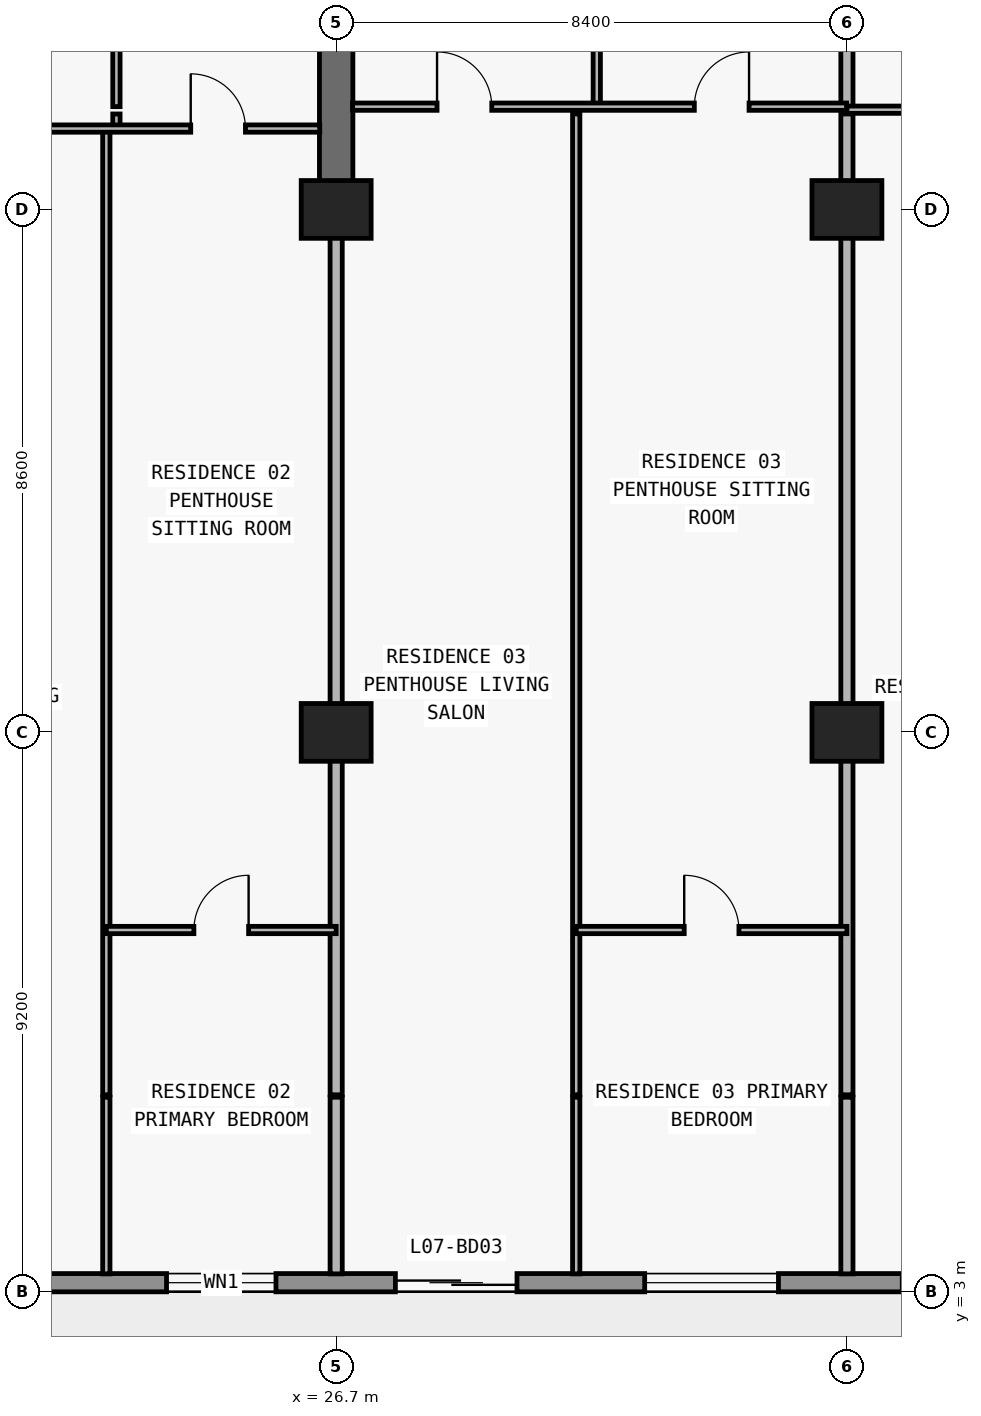
"""IFC4 building model, lengths in metres.
Left out: names, types, materials, properties, quantities, classifications, styles, units other than length and angle.
Written with IfcOpenShell. Run it as: python <this file> out.ifc"""

import sys

from ifc_helpers import new_model, si_unit, direction, frame, frame_2d, origin, origin_2d, place, context, subcontext, project, spatial, rectangle, extrude, element, fill, save


model = new_model("IFC4")
c1 = context("Model", 3, precision=1e-05, world=origin(), true_north=direction((0.0, 1.0)))
c2 = subcontext(c1, "Body", "Model", "MODEL_VIEW")
j1 = project(units=[si_unit("LENGTHUNIT", "METRE"), si_unit("PLANEANGLEUNIT", "RADIAN")], contexts=[c1])
p1 = place(None, origin())
s1 = spatial("IfcSite", under=j1, at=p1, CompositionType="ELEMENT")
p2 = place(p1, origin())
s2 = spatial("IfcBuilding", under=s1, at=p2, CompositionType="ELEMENT")
p3 = place(p2, frame((0.0, 0.0, 33.3)))
s3 = spatial("IfcBuildingStorey", under=s2, at=p3, CompositionType="ELEMENT", Elevation=33.3)
for number, where, z_axis, x_axis in (
    (1, (26.7, 12.2, 0.0), (0.0, 0.0, 1.0), (1.0, 0.0, 0.0)),
    (2, (35.1, 12.2, 0.0), (0.0, 0.0, 1.0), (1.0, 0.0, 0.0)),
    (3, (26.7, 20.8, 0.0), (0.0, 0.0, 1.0), (1.0, 0.0, 0.0)),
    (4, (35.1, 20.8, 0.0), (0.0, 0.0, 1.0), (1.0, 0.0, 0.0)),
):
    element("IfcColumn", number, at=place(p3, frame(where, z_axis=z_axis, x_axis=x_axis)), inside=s3, PredefinedType="COLUMN", context=c2, shape_type="SweptSolid", body=[
        extrude(rectangle(XDim=1.15, YDim=0.95, at=origin_2d()), origin(), (0.0, 0.0, 1.0), 3.05),
    ])
p4 = place(p3, frame((26.7, 20.8, 0.0), z_axis=(0.0, 0.0, 1.0), x_axis=(0.0, 1.0, 0.0)))
e5 = element("IfcWall", 5, at=p4, inside=s3, PredefinedType="SHEAR", context=c2, shape_type="SweptSolid", body=[
    extrude(rectangle(XDim=8.6, YDim=0.55, at=frame_2d((4.3, 0.0))), origin(), (0.0, 0.0, 1.0), 3.05),
])
p5 = place(p3, frame((72.7, 3.15, 0.0), z_axis=(0.0, 0.0, 1.0), x_axis=(-1.0, 0.0, 0.0)))
e6 = element("IfcWall", 6, at=p5, inside=s3, PredefinedType="STANDARD", context=c2, shape_type="SweptSolid", body=[
    extrude(rectangle(XDim=67.6, YDim=0.3, at=frame_2d((33.8, 0.0))), origin(), (0.0, 0.0, 1.0), 3.05),
])
p6 = place(p5, frame((59.826, 0.0, 0.0)))
e7 = element("IfcOpeningElement", 7, at=p6, cuts=e6, PredefinedType="OPENING", context=c2, shape_type="SweptSolid", body=[
    extrude(rectangle(XDim=2.0, YDim=2.3, at=frame_2d((1.0, 1.15))), frame((0.0, 0.16, 0.0), z_axis=(0.0, -1.0, 0.0), x_axis=(1.0, 0.0, 0.0)), (0.0, 0.0, 1.0), 0.32),
])
p7 = place(p5, frame((55.526, 0.0, 0.85)))
e8 = element("IfcOpeningElement", 8, at=p7, cuts=e6, PredefinedType="OPENING", context=c2, shape_type="SweptSolid", body=[
    extrude(rectangle(XDim=2.2, YDim=1.55, at=frame_2d((1.1, 0.775))), frame((0.0, 0.16, 0.0), z_axis=(0.0, -1.0, 0.0), x_axis=(1.0, 0.0, 0.0)), (0.0, 0.0, 1.0), 0.32),
])
p8 = place(p5, frame((51.09, 0.0, 0.0)))
e9 = element("IfcOpeningElement", 9, at=p8, cuts=e6, PredefinedType="OPENING", context=c2, shape_type="SweptSolid", body=[
    extrude(rectangle(XDim=2.0, YDim=2.3, at=frame_2d((1.0, 1.15))), frame((0.0, 0.16, 0.0), z_axis=(0.0, -1.0, 0.0), x_axis=(1.0, 0.0, 0.0)), (0.0, 0.0, 1.0), 0.32),
])
p9 = place(p5, frame((46.99, 0.0, 0.85)))
e10 = element("IfcOpeningElement", 10, at=p9, cuts=e6, PredefinedType="OPENING", context=c2, shape_type="SweptSolid", body=[
    extrude(rectangle(XDim=1.8, YDim=1.55, at=frame_2d((0.9, 0.775))), frame((0.0, 0.16, 0.0), z_axis=(0.0, -1.0, 0.0), x_axis=(1.0, 0.0, 0.0)), (0.0, 0.0, 1.0), 0.32),
])
p10 = place(p5, frame((43.026, 0.0, 0.0)))
e11 = element("IfcOpeningElement", 11, at=p10, cuts=e6, PredefinedType="OPENING", context=c2, shape_type="SweptSolid", body=[
    extrude(rectangle(XDim=2.0, YDim=2.3, at=frame_2d((1.0, 1.15))), frame((0.0, 0.16, 0.0), z_axis=(0.0, -1.0, 0.0), x_axis=(1.0, 0.0, 0.0)), (0.0, 0.0, 1.0), 0.32),
])
p11 = place(p5, frame((38.726, 0.0, 0.85)))
e12 = element("IfcOpeningElement", 12, at=p11, cuts=e6, PredefinedType="OPENING", context=c2, shape_type="SweptSolid", body=[
    extrude(rectangle(XDim=2.2, YDim=1.55, at=frame_2d((1.1, 0.775))), frame((0.0, 0.16, 0.0), z_axis=(0.0, -1.0, 0.0), x_axis=(1.0, 0.0, 0.0)), (0.0, 0.0, 1.0), 0.32),
])
p12 = place(p5, frame((34.69, 0.0, 0.0)))
e13 = element("IfcOpeningElement", 13, at=p12, cuts=e6, PredefinedType="OPENING", context=c2, shape_type="SweptSolid", body=[
    extrude(rectangle(XDim=2.0, YDim=2.3, at=frame_2d((1.0, 1.15))), frame((0.0, 0.16, 0.0), z_axis=(0.0, -1.0, 0.0), x_axis=(1.0, 0.0, 0.0)), (0.0, 0.0, 1.0), 0.32),
])
p13 = place(p5, frame((30.81, 0.0, 0.65)))
e14 = element("IfcOpeningElement", 14, at=p13, cuts=e6, PredefinedType="OPENING", context=c2, shape_type="SweptSolid", body=[
    extrude(rectangle(XDim=2.6, YDim=1.85, at=frame_2d((1.3, 0.925))), frame((0.0, 0.16, 0.0), z_axis=(0.0, -1.0, 0.0), x_axis=(1.0, 0.0, 0.0)), (0.0, 0.0, 1.0), 0.32),
])
p14 = place(p5, frame((24.7, 0.0, 0.85)))
e15 = element("IfcOpeningElement", 15, at=p14, cuts=e6, PredefinedType="OPENING", context=c2, shape_type="SweptSolid", body=[
    extrude(rectangle(XDim=2.2, YDim=1.55, at=frame_2d((1.1, 0.775))), frame((0.0, 0.16, 0.0), z_axis=(0.0, -1.0, 0.0), x_axis=(1.0, 0.0, 0.0)), (0.0, 0.0, 1.0), 0.32),
])
p15 = place(p5, frame((18.626, 0.0, 0.0)))
e16 = element("IfcOpeningElement", 16, at=p15, cuts=e6, PredefinedType="OPENING", context=c2, shape_type="SweptSolid", body=[
    extrude(rectangle(XDim=2.0, YDim=2.3, at=frame_2d((1.0, 1.15))), frame((0.0, 0.16, 0.0), z_axis=(0.0, -1.0, 0.0), x_axis=(1.0, 0.0, 0.0)), (0.0, 0.0, 1.0), 0.32),
])
p16 = place(p5, frame((14.326, 0.0, 0.85)))
e17 = element("IfcOpeningElement", 17, at=p16, cuts=e6, PredefinedType="OPENING", context=c2, shape_type="SweptSolid", body=[
    extrude(rectangle(XDim=2.2, YDim=1.55, at=frame_2d((1.1, 0.775))), frame((0.0, 0.16, 0.0), z_axis=(0.0, -1.0, 0.0), x_axis=(1.0, 0.0, 0.0)), (0.0, 0.0, 1.0), 0.32),
])
p17 = place(p5, frame((9.89, 0.0, 0.0)))
e18 = element("IfcOpeningElement", 18, at=p17, cuts=e6, PredefinedType="OPENING", context=c2, shape_type="SweptSolid", body=[
    extrude(rectangle(XDim=2.0, YDim=2.3, at=frame_2d((1.0, 1.15))), frame((0.0, 0.16, 0.0), z_axis=(0.0, -1.0, 0.0), x_axis=(1.0, 0.0, 0.0)), (0.0, 0.0, 1.0), 0.32),
])
p18 = place(p5, frame((5.79, 0.0, 0.85)))
e19 = element("IfcOpeningElement", 19, at=p18, cuts=e6, PredefinedType="OPENING", context=c2, shape_type="SweptSolid", body=[
    extrude(rectangle(XDim=1.8, YDim=1.55, at=frame_2d((0.9, 0.775))), frame((0.0, 0.16, 0.0), z_axis=(0.0, -1.0, 0.0), x_axis=(1.0, 0.0, 0.0)), (0.0, 0.0, 1.0), 0.32),
])
p19 = place(p3, frame((22.92, 3.295, 0.0), z_axis=(0.0, 0.0, 1.0), x_axis=(0.0, 1.0, 0.0)))
e20 = element("IfcWall", 20, at=p19, inside=s3, PredefinedType="PARTITIONING", context=c2, shape_type="SweptSolid", body=[
    extrude(rectangle(XDim=2.905, YDim=0.12, at=frame_2d((1.453, 0.0))), origin(), (0.0, 0.0, 1.0), 3.05),
])
p20 = place(p3, frame((22.92, 6.24, 0.0), z_axis=(0.0, 0.0, 1.0), x_axis=(0.0, 1.0, 0.0)))
e21 = element("IfcWall", 21, at=p20, inside=s3, PredefinedType="PARTITIONING", context=c2, shape_type="SweptSolid", body=[
    extrude(rectangle(XDim=15.89, YDim=0.12, at=frame_2d((7.945, 0.0))), origin(), (0.0, 0.0, 1.0), 3.05),
])
p21 = place(p3, frame((23.086, 22.135, 0.0), z_axis=(0.0, 0.0, 1.0), x_axis=(0.0, 1.0, 0.0)))
e22 = element("IfcWall", 22, at=p21, inside=s3, PredefinedType="PARTITIONING", context=c2, shape_type="SweptSolid", body=[
    extrude(rectangle(XDim=0.235, YDim=0.12, at=frame_2d((0.118, 0.0))), origin(), (0.0, 0.0, 1.0), 3.05),
])
p22 = place(p3, frame((23.086, 22.49, 0.0), z_axis=(0.0, 0.0, 1.0), x_axis=(0.0, 1.0, 0.0)))
e23 = element("IfcWall", 23, at=p22, inside=s3, PredefinedType="PARTITIONING", context=c2, shape_type="SweptSolid", body=[
    extrude(rectangle(XDim=4.69, YDim=0.12, at=frame_2d((2.345, 0.0))), origin(), (0.0, 0.0, 1.0), 3.05),
])
p23 = place(p22, frame((1.895, 0.0, 0.0)))
e24 = element("IfcOpeningElement", 24, at=p23, cuts=e23, PredefinedType="OPENING", context=c2, shape_type="SweptSolid", body=[
    extrude(rectangle(XDim=0.9, YDim=2.15, at=frame_2d((0.45, 1.075))), frame((0.0, 0.07, 0.0), z_axis=(0.0, -1.0, 0.0), x_axis=(1.0, 0.0, 0.0)), (0.0, 0.0, 1.0), 0.14),
])
p24 = place(p3, frame((26.7, 3.295, 0.0), z_axis=(0.0, 0.0, 1.0), x_axis=(0.0, 1.0, 0.0)))
e25 = element("IfcWall", 25, at=p24, inside=s3, PredefinedType="PARTITIONING", context=c2, shape_type="SweptSolid", body=[
    extrude(rectangle(XDim=2.905, YDim=0.2, at=frame_2d((1.453, 0.0))), origin(), (0.0, 0.0, 1.0), 3.05),
])
p25 = place(p3, frame((26.7, 6.24, 0.0), z_axis=(0.0, 0.0, 1.0), x_axis=(0.0, 1.0, 0.0)))
e26 = element("IfcWall", 26, at=p25, inside=s3, PredefinedType="PARTITIONING", context=c2, shape_type="SweptSolid", body=[
    extrude(rectangle(XDim=14.555, YDim=0.2, at=frame_2d((7.277, 0.0))), origin(), (0.0, 0.0, 1.0), 2.11),
])
p26 = place(p3, frame((30.648, 3.295, 0.0), z_axis=(0.0, 0.0, 1.0), x_axis=(0.0, 1.0, 0.0)))
e27 = element("IfcWall", 27, at=p26, inside=s3, PredefinedType="PARTITIONING", context=c2, shape_type="SweptSolid", body=[
    extrude(rectangle(XDim=2.905, YDim=0.12, at=frame_2d((1.453, 0.0))), origin(), (0.0, 0.0, 1.0), 3.05),
])
p27 = place(p3, frame((30.648, 6.24, 0.0), z_axis=(0.0, 0.0, 1.0), x_axis=(0.0, 1.0, 0.0)))
e28 = element("IfcWall", 28, at=p27, inside=s3, PredefinedType="PARTITIONING", context=c2, shape_type="SweptSolid", body=[
    extrude(rectangle(XDim=16.13, YDim=0.12, at=frame_2d((8.065, 0.0))), origin(), (0.0, 0.0, 1.0), 3.05),
])
p28 = place(p3, frame((30.986, 22.49, 0.0), z_axis=(0.0, 0.0, 1.0), x_axis=(0.0, 1.0, 0.0)))
e29 = element("IfcWall", 29, at=p28, inside=s3, PredefinedType="PARTITIONING", context=c2, shape_type="SweptSolid", body=[
    extrude(rectangle(XDim=4.69, YDim=0.12, at=frame_2d((2.345, 0.0))), origin(), (0.0, 0.0, 1.0), 3.05),
])
p29 = place(p28, frame((1.895, 0.0, 0.0)))
e30 = element("IfcOpeningElement", 30, at=p29, cuts=e29, PredefinedType="OPENING", context=c2, shape_type="SweptSolid", body=[
    extrude(rectangle(XDim=0.9, YDim=2.15, at=frame_2d((0.45, 1.075))), frame((0.0, 0.07, 0.0), z_axis=(0.0, -1.0, 0.0), x_axis=(1.0, 0.0, 0.0)), (0.0, 0.0, 1.0), 0.14),
])
p30 = place(p3, frame((35.1, 3.295, 0.0), z_axis=(0.0, 0.0, 1.0), x_axis=(0.0, 1.0, 0.0)))
e31 = element("IfcWall", 31, at=p30, inside=s3, PredefinedType="PARTITIONING", context=c2, shape_type="SweptSolid", body=[
    extrude(rectangle(XDim=2.905, YDim=0.2, at=frame_2d((1.453, 0.0))), origin(), (0.0, 0.0, 1.0), 3.05),
])
p31 = place(p3, frame((35.1, 6.24, 0.0), z_axis=(0.0, 0.0, 1.0), x_axis=(0.0, 1.0, 0.0)))
e32 = element("IfcWall", 32, at=p31, inside=s3, PredefinedType="PARTITIONING", context=c2, shape_type="SweptSolid", body=[
    extrude(rectangle(XDim=16.13, YDim=0.2, at=frame_2d((8.065, 0.0))), origin(), (0.0, 0.0, 1.0), 2.11),
])
p32 = place(p3, frame((35.1, 22.49, 0.0), z_axis=(0.0, 0.0, 1.0), x_axis=(0.0, 1.0, 0.0)))
e33 = element("IfcWall", 33, at=p32, inside=s3, PredefinedType="PARTITIONING", context=c2, shape_type="SweptSolid", body=[
    extrude(rectangle(XDim=4.69, YDim=0.2, at=frame_2d((2.345, 0.0))), origin(), (0.0, 0.0, 1.0), 2.11),
])
p33 = place(p3, frame((22.92, 8.95, 0.0), z_axis=(0.0, 0.0, 1.0), x_axis=(1.0, 0.0, 0.0)))
e34 = element("IfcWall", 34, at=p33, inside=s3, PredefinedType="PARTITIONING", context=c2, shape_type="SweptSolid", body=[
    extrude(rectangle(XDim=3.78, YDim=0.12, at=frame_2d((1.89, 0.0))), origin(), (0.0, 0.0, 1.0), 3.05),
])
p34 = place(p33, frame((1.44, 0.0, 0.0)))
e35 = element("IfcOpeningElement", 35, at=p34, cuts=e34, PredefinedType="OPENING", context=c2, shape_type="SweptSolid", body=[
    extrude(rectangle(XDim=0.9, YDim=2.15, at=frame_2d((0.45, 1.075))), frame((0.0, 0.07, 0.0), z_axis=(0.0, -1.0, 0.0), x_axis=(1.0, 0.0, 0.0)), (0.0, 0.0, 1.0), 0.14),
])
p35 = place(p3, frame((30.648, 8.95, 0.0), z_axis=(0.0, 0.0, 1.0), x_axis=(1.0, 0.0, 0.0)))
e36 = element("IfcWall", 36, at=p35, inside=s3, PredefinedType="PARTITIONING", context=c2, shape_type="SweptSolid", body=[
    extrude(rectangle(XDim=4.452, YDim=0.12, at=frame_2d((2.226, 0.0))), origin(), (0.0, 0.0, 1.0), 3.05),
])
p36 = place(p35, frame((1.776, 0.0, 0.0)))
e37 = element("IfcOpeningElement", 37, at=p36, cuts=e36, PredefinedType="OPENING", context=c2, shape_type="SweptSolid", body=[
    extrude(rectangle(XDim=0.9, YDim=2.15, at=frame_2d((0.45, 1.075))), frame((0.0, 0.07, 0.0), z_axis=(0.0, -1.0, 0.0), x_axis=(1.0, 0.0, 0.0)), (0.0, 0.0, 1.0), 0.14),
])
p37 = place(p3, frame((18.3, 22.13, 0.0), z_axis=(0.0, 0.0, 1.0), x_axis=(1.0, 0.0, 0.0)))
e38 = element("IfcWall", 38, at=p37, inside=s3, PredefinedType="PARTITIONING", context=c2, shape_type="SweptSolid", body=[
    extrude(rectangle(XDim=8.13, YDim=0.12, at=frame_2d((4.065, 0.0))), origin(), (0.0, 0.0, 1.0), 3.05),
])
p38 = place(p37, frame((1.86, 0.0, 0.0)))
e39 = element("IfcOpeningElement", 39, at=p38, cuts=e38, PredefinedType="OPENING", context=c2, shape_type="SweptSolid", body=[
    extrude(rectangle(XDim=0.9, YDim=2.15, at=frame_2d((0.45, 1.075))), frame((0.0, 0.07, 0.0), z_axis=(0.0, -1.0, 0.0), x_axis=(1.0, 0.0, 0.0)), (0.0, 0.0, 1.0), 0.14),
])
p39 = place(p37, frame((6.008, 0.0, 0.0)))
e40 = element("IfcOpeningElement", 40, at=p39, cuts=e38, PredefinedType="OPENING", context=c2, shape_type="SweptSolid", body=[
    extrude(rectangle(XDim=0.9, YDim=2.15, at=frame_2d((0.45, 1.075))), frame((0.0, 0.07, 0.0), z_axis=(0.0, -1.0, 0.0), x_axis=(1.0, 0.0, 0.0)), (0.0, 0.0, 1.0), 0.14),
])
p40 = place(p3, frame((35.1, 22.44, 0.0), z_axis=(0.0, 0.0, 1.0), x_axis=(1.0, 0.0, 0.0)))
e41 = element("IfcWall", 41, at=p40, inside=s3, PredefinedType="PARTITIONING", context=c2, shape_type="SweptSolid", body=[
    extrude(rectangle(XDim=7.6, YDim=0.12, at=frame_2d((3.8, 0.0))), origin(), (0.0, 0.0, 1.0), 3.05),
])
p41 = place(p40, frame((3.35, 0.0, 0.0)))
e42 = element("IfcOpeningElement", 42, at=p41, cuts=e41, PredefinedType="OPENING", context=c2, shape_type="SweptSolid", body=[
    extrude(rectangle(XDim=0.9, YDim=2.15, at=frame_2d((0.45, 1.075))), frame((0.0, 0.07, 0.0), z_axis=(0.0, -1.0, 0.0), x_axis=(1.0, 0.0, 0.0)), (0.0, 0.0, 1.0), 0.14),
])
p42 = place(p3, frame((26.97, 22.49, 0.0), z_axis=(0.0, 0.0, 1.0), x_axis=(1.0, 0.0, 0.0)))
e43 = element("IfcWall", 43, at=p42, inside=s3, PredefinedType="PARTITIONING", context=c2, shape_type="SweptSolid", body=[
    extrude(rectangle(XDim=8.125, YDim=0.12, at=frame_2d((4.062, 0.0))), origin(), (0.0, 0.0, 1.0), 3.05),
])
p43 = place(p42, frame((1.389, 0.0, 0.0)))
e44 = element("IfcOpeningElement", 44, at=p43, cuts=e43, PredefinedType="OPENING", context=c2, shape_type="SweptSolid", body=[
    extrude(rectangle(XDim=0.9, YDim=2.15, at=frame_2d((0.45, 1.075))), frame((0.0, 0.07, 0.0), z_axis=(0.0, -1.0, 0.0), x_axis=(1.0, 0.0, 0.0)), (0.0, 0.0, 1.0), 0.14),
])
p44 = place(p42, frame((5.621, 0.0, 0.0)))
e45 = element("IfcOpeningElement", 45, at=p44, cuts=e43, PredefinedType="OPENING", context=c2, shape_type="SweptSolid", body=[
    extrude(rectangle(XDim=0.9, YDim=2.15, at=frame_2d((0.45, 1.075))), frame((0.0, 0.07, 0.0), z_axis=(0.0, -1.0, 0.0), x_axis=(1.0, 0.0, 0.0)), (0.0, 0.0, 1.0), 0.14),
])
p45 = place(p9, origin())
e46 = element("IfcWindow", 46, at=p45, inside=s3, PartitioningType="SINGLE_PANEL", PredefinedType="WINDOW", context=c2, shape_type="SweptSolid", body=[
    extrude(rectangle(XDim=1.8, YDim=1.55, at=frame_2d((0.9, 0.775))), frame((0.0, 0.03, 0.0), z_axis=(0.0, -1.0, 0.0), x_axis=(1.0, 0.0, 0.0)), (0.0, 0.0, 1.0), 0.06),
])
fill(e10, e46)
p46 = place(p10, origin())
e47 = element("IfcDoor", 47, at=p46, inside=s3, OperationType="DOUBLE_DOOR_SLIDING", PredefinedType="DOOR", context=c2, shape_type="SweptSolid", body=[
    extrude(rectangle(XDim=2.0, YDim=2.3, at=frame_2d((1.0, 1.15))), frame((0.0, 0.025, 0.0), z_axis=(0.0, -1.0, 0.0), x_axis=(1.0, 0.0, 0.0)), (0.0, 0.0, 1.0), 0.05),
])
fill(e11, e47)
p47 = place(p11, origin())
e48 = element("IfcWindow", 48, at=p47, inside=s3, PartitioningType="SINGLE_PANEL", PredefinedType="WINDOW", context=c2, shape_type="SweptSolid", body=[
    extrude(rectangle(XDim=2.2, YDim=1.55, at=frame_2d((1.1, 0.775))), frame((0.0, 0.03, 0.0), z_axis=(0.0, -1.0, 0.0), x_axis=(1.0, 0.0, 0.0)), (0.0, 0.0, 1.0), 0.06),
])
fill(e12, e48)
p48 = place(p39, origin())
e49 = element("IfcDoor", 49, at=p48, inside=s3, OperationType="SINGLE_SWING_LEFT", PredefinedType="DOOR", context=c2, shape_type="SweptSolid", body=[
    extrude(rectangle(XDim=0.9, YDim=2.15, at=frame_2d((0.45, 1.075))), frame((0.0, 0.025, 0.0), z_axis=(0.0, -1.0, 0.0), x_axis=(1.0, 0.0, 0.0)), (0.0, 0.0, 1.0), 0.05),
])
fill(e40, e49)
p49 = place(p34, origin())
e50 = element("IfcDoor", 50, at=p49, inside=s3, OperationType="SINGLE_SWING_RIGHT", PredefinedType="DOOR", context=c2, shape_type="SweptSolid", body=[
    extrude(rectangle(XDim=0.9, YDim=2.15, at=frame_2d((0.45, 1.075))), frame((0.0, 0.025, 0.0), z_axis=(0.0, -1.0, 0.0), x_axis=(1.0, 0.0, 0.0)), (0.0, 0.0, 1.0), 0.05),
])
fill(e35, e50)
p50 = place(p43, origin())
e51 = element("IfcDoor", 51, at=p50, inside=s3, OperationType="SINGLE_SWING_LEFT", PredefinedType="DOOR", context=c2, shape_type="SweptSolid", body=[
    extrude(rectangle(XDim=0.9, YDim=2.15, at=frame_2d((0.45, 1.075))), frame((0.0, 0.025, 0.0), z_axis=(0.0, -1.0, 0.0), x_axis=(1.0, 0.0, 0.0)), (0.0, 0.0, 1.0), 0.05),
])
fill(e44, e51)
p51 = place(p44, origin())
e52 = element("IfcDoor", 52, at=p51, inside=s3, OperationType="SINGLE_SWING_RIGHT", PredefinedType="DOOR", context=c2, shape_type="SweptSolid", body=[
    extrude(rectangle(XDim=0.9, YDim=2.15, at=frame_2d((0.45, 1.075))), frame((0.0, 0.025, 0.0), z_axis=(0.0, -1.0, 0.0), x_axis=(1.0, 0.0, 0.0)), (0.0, 0.0, 1.0), 0.05),
])
fill(e45, e52)
p52 = place(p36, origin())
e53 = element("IfcDoor", 53, at=p52, inside=s3, OperationType="SINGLE_SWING_LEFT", PredefinedType="DOOR", context=c2, shape_type="SweptSolid", body=[
    extrude(rectangle(XDim=0.9, YDim=2.15, at=frame_2d((0.45, 1.075))), frame((0.0, 0.025, 0.0), z_axis=(0.0, -1.0, 0.0), x_axis=(1.0, 0.0, 0.0)), (0.0, 0.0, 1.0), 0.05),
])
fill(e37, e53)
save(model, sys.argv[1])
